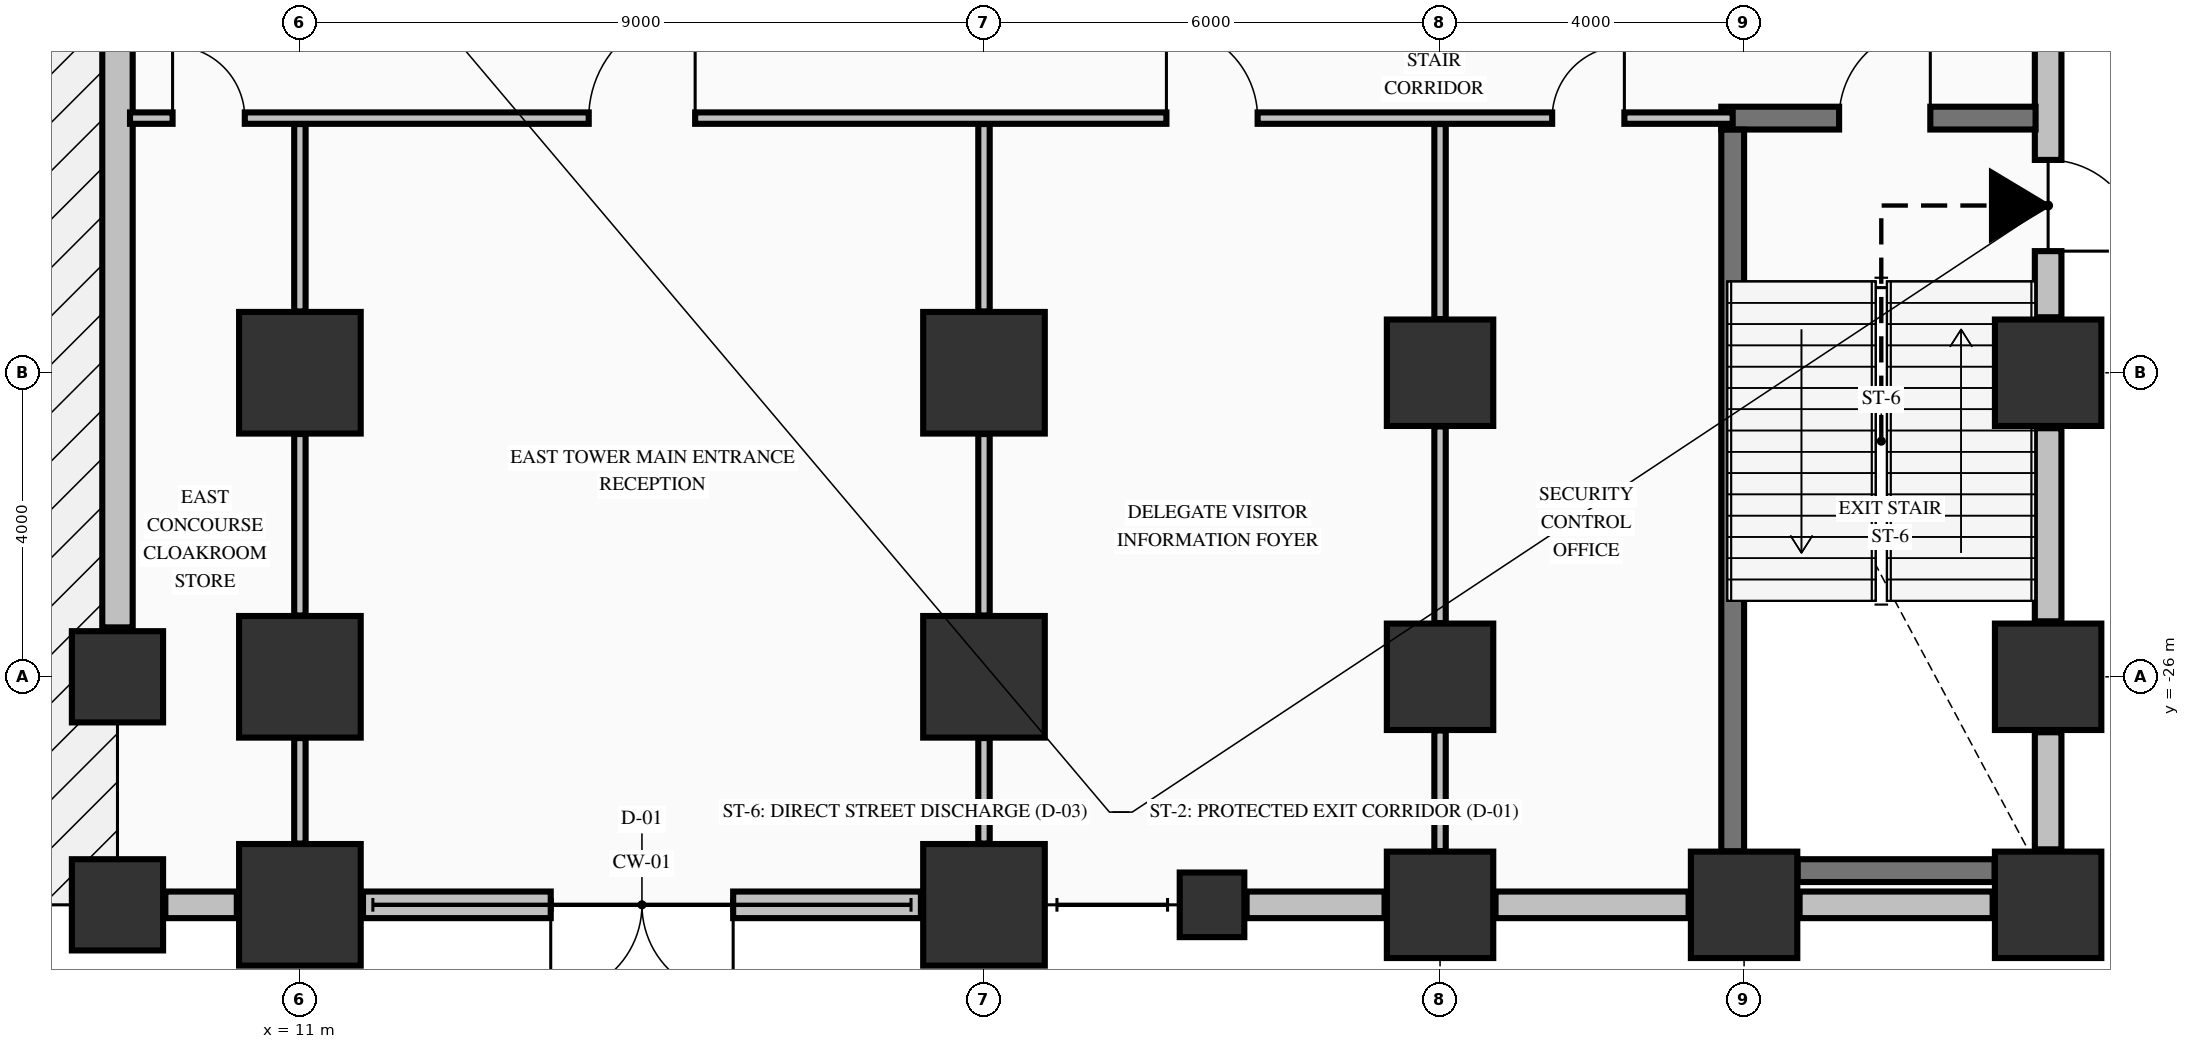
"""IFC4 building model, lengths in metres.
Left out: names, types, materials, properties, quantities, classifications, styles, units other than length and angle.
Written with IfcOpenShell. Run it as: python <this file> out.ifc"""

import sys

from ifc_helpers import new_model, si_unit, direction, frame, frame_2d, origin, origin_2d, place, context, subcontext, project, spatial, rectangle, extrude, element, fill, save


model = new_model("IFC4")
c1 = context("Model", 3, precision=1e-05, world=origin(), true_north=direction((0.0, 1.0)))
c2 = subcontext(c1, "Body", "Model", "MODEL_VIEW")
j1 = project(units=[si_unit("LENGTHUNIT", "METRE"), si_unit("PLANEANGLEUNIT", "RADIAN")], contexts=[c1])
p1 = place(None, origin())
s1 = spatial("IfcSite", under=j1, at=p1, CompositionType="ELEMENT")
p2 = place(p1, origin())
s2 = spatial("IfcBuilding", under=s1, at=p2, CompositionType="ELEMENT")
p3 = place(p2, origin())
s3 = spatial("IfcBuildingStorey", under=s2, at=p3, CompositionType="ELEMENT", Elevation=0.0)
for number, where, z_axis, x_axis in (
    (1, (11.0, -29.0, 0.0), (0.0, 0.0, 1.0), (1.0, 0.0, 0.0)),
    (2, (11.0, -26.0, 0.0), (0.0, 0.0, 1.0), (1.0, 0.0, 0.0)),
    (3, (11.0, -22.0, 0.0), (0.0, 0.0, 1.0), (1.0, 0.0, 0.0)),
    (4, (20.0, -29.0, 0.0), (0.0, 0.0, 1.0), (1.0, 0.0, 0.0)),
    (5, (20.0, -26.0, 0.0), (0.0, 0.0, 1.0), (1.0, 0.0, 0.0)),
    (6, (20.0, -22.0, 0.0), (0.0, 0.0, 1.0), (1.0, 0.0, 0.0)),
):
    element("IfcColumn", number, at=place(p3, frame(where, z_axis=z_axis, x_axis=x_axis)), inside=s3, PredefinedType="COLUMN", context=c2, shape_type="SweptSolid", body=[
        extrude(rectangle(XDim=1.6, YDim=1.6, at=origin_2d()), origin(), (0.0, 0.0, 1.0), 5.09),
    ])
for number, where, z_axis, x_axis in (
    (7, (26.0, -29.0, 0.0), (0.0, 0.0, 1.0), (1.0, 0.0, 0.0)),
    (8, (26.0, -26.0, 0.0), (0.0, 0.0, 1.0), (1.0, 0.0, 0.0)),
    (9, (26.0, -22.0, 0.0), (0.0, 0.0, 1.0), (1.0, 0.0, 0.0)),
    (10, (30.0, -29.0, 0.0), (0.0, 0.0, 1.0), (1.0, 0.0, 0.0)),
    (11, (34.0, -29.0, 0.0), (0.0, 0.0, 1.0), (1.0, 0.0, 0.0)),
    (12, (34.0, -26.0, 0.0), (0.0, 0.0, 1.0), (1.0, 0.0, 0.0)),
    (13, (34.0, -22.0, 0.0), (0.0, 0.0, 1.0), (1.0, 0.0, 0.0)),
):
    element("IfcColumn", number, at=place(p3, frame(where, z_axis=z_axis, x_axis=x_axis)), inside=s3, PredefinedType="COLUMN", context=c2, shape_type="SweptSolid", body=[
        extrude(rectangle(XDim=1.4, YDim=1.4, at=origin_2d()), origin(), (0.0, 0.0, 1.0), 5.09),
    ])
for number, where, z_axis, x_axis in (
    (14, (8.6, -29.0, 0.0), (0.0, 0.0, 1.0), (1.0, 0.0, 0.0)),
    (15, (8.6, -26.0, 0.0), (0.0, 0.0, 1.0), (1.0, 0.0, 0.0)),
):
    element("IfcColumn", number, at=place(p3, frame(where, z_axis=z_axis, x_axis=x_axis)), inside=s3, PredefinedType="COLUMN", context=c2, shape_type="SweptSolid", body=[
        extrude(rectangle(XDim=1.2, YDim=1.2, at=origin_2d()), origin(), (0.0, 0.0, 1.0), 5.09),
    ])
p4 = place(p3, frame((23.0, -29.0, 0.0), z_axis=(0.0, 0.0, 1.0), x_axis=(1.0, 0.0, 0.0)))
e16 = element("IfcColumn", 16, at=p4, inside=s3, PredefinedType="PILASTER", context=c2, shape_type="SweptSolid", body=[
    extrude(rectangle(XDim=0.85, YDim=0.85, at=origin_2d()), origin(), (0.0, 0.0, 1.0), 5.09),
])
p5 = place(p3, frame((9.23, -29.0, 0.0), z_axis=(0.0, 0.0, 1.0), x_axis=(1.0, 0.0, 0.0)))
e17 = element("IfcWall", 17, at=p5, inside=s3, PredefinedType="STANDARD", context=c2, shape_type="SweptSolid", body=[
    extrude(rectangle(XDim=0.94, YDim=0.35, at=frame_2d((0.47, 0.0))), origin(), (0.0, 0.0, 1.0), 4.482),
])
p6 = place(p3, frame((19.17, -29.0, 0.0), z_axis=(0.0, 0.0, 1.0), x_axis=(-1.0, 0.0, 0.0)))
e18 = element("IfcWall", 18, at=p6, inside=s3, PredefinedType="STANDARD", context=c2, shape_type="SweptSolid", body=[
    extrude(rectangle(XDim=7.34, YDim=0.35, at=frame_2d((3.67, 0.0))), origin(), (0.0, 0.0, 1.0), 2.85),
])
p7 = place(p6, frame((2.47, 0.0, 0.0)))
e19 = element("IfcOpeningElement", 19, at=p7, cuts=e18, PredefinedType="OPENING", context=c2, shape_type="SweptSolid", body=[
    extrude(rectangle(XDim=2.4, YDim=2.6, at=frame_2d((1.2, 1.3))), frame((0.0, 0.185, 0.0), z_axis=(0.0, -1.0, 0.0), x_axis=(1.0, 0.0, 0.0)), (0.0, 0.0, 1.0), 0.37),
])
p8 = place(p3, frame((23.455, -29.0, 0.0), z_axis=(0.0, 0.0, 1.0), x_axis=(1.0, 0.0, 0.0)))
e20 = element("IfcWall", 20, at=p8, inside=s3, PredefinedType="STANDARD", context=c2, shape_type="SweptSolid", body=[
    extrude(rectangle(XDim=1.815, YDim=0.35, at=frame_2d((0.907, 0.0))), origin(), (0.0, 0.0, 1.0), 4.482),
])
for number, where, z_axis, x_axis in (
    (21, (26.73, -29.0, 0.0), (0.0, 0.0, 1.0), (1.0, 0.0, 0.0)),
    (22, (30.73, -29.0, 0.0), (0.0, 0.0, 1.0), (1.0, 0.0, 0.0)),
):
    element("IfcWall", number, at=place(p3, frame(where, z_axis=z_axis, x_axis=x_axis)), inside=s3, PredefinedType="STANDARD", context=c2, shape_type="SweptSolid", body=[
        extrude(rectangle(XDim=2.54, YDim=0.35, at=frame_2d((1.27, 0.0))), origin(), (0.0, 0.0, 1.0), 4.482),
    ])
p9 = place(p3, frame((34.0, -26.73, 0.0), z_axis=(0.0, 0.0, 1.0), x_axis=(0.0, -1.0, 0.0)))
e23 = element("IfcWall", 23, at=p9, inside=s3, PredefinedType="STANDARD", context=c2, shape_type="SweptSolid", body=[
    extrude(rectangle(XDim=1.54, YDim=0.35, at=frame_2d((0.77, 0.0))), origin(), (0.0, 0.0, 1.0), 5.09),
])
p10 = place(p3, frame((34.0, -22.73, 0.0), z_axis=(0.0, 0.0, 1.0), x_axis=(0.0, -1.0, 0.0)))
e24 = element("IfcWall", 24, at=p10, inside=s3, PredefinedType="STANDARD", context=c2, shape_type="SweptSolid", body=[
    extrude(rectangle(XDim=2.54, YDim=0.35, at=frame_2d((1.27, 0.0))), origin(), (0.0, 0.0, 1.0), 5.09),
])
p11 = place(p3, frame((34.0, -16.73, 0.0), z_axis=(0.0, 0.0, 1.0), x_axis=(0.0, -1.0, 0.0)))
e25 = element("IfcWall", 25, at=p11, inside=s3, PredefinedType="STANDARD", context=c2, shape_type="SweptSolid", body=[
    extrude(rectangle(XDim=4.54, YDim=0.35, at=frame_2d((2.27, 0.0))), origin(), (0.0, 0.0, 1.0), 5.09),
])
p12 = place(p11, frame((2.47, 0.0, 0.0)))
e26 = element("IfcOpeningElement", 26, at=p12, cuts=e25, PredefinedType="OPENING", context=c2, shape_type="SweptSolid", body=[
    extrude(rectangle(XDim=1.2, YDim=2.2, at=frame_2d((0.6, 1.1))), frame((0.0, 0.185, 0.0), z_axis=(0.0, -1.0, 0.0), x_axis=(1.0, 0.0, 0.0)), (0.0, 0.0, 1.0), 0.37),
])
p13 = place(p3, frame((8.6, -0.65, 0.0), z_axis=(0.0, 0.0, 1.0), x_axis=(0.0, -1.0, 0.0)))
e27 = element("IfcWall", 27, at=p13, inside=s3, PredefinedType="STANDARD", context=c2, shape_type="SweptSolid", body=[
    extrude(rectangle(XDim=24.7, YDim=0.4, at=frame_2d((12.35, 0.0))), origin(), (0.0, 0.0, 1.0), 4.132),
])
p14 = place(p13, frame((10.5, 0.0, 0.0)))
e28 = element("IfcOpeningElement", 28, at=p14, cuts=e27, PredefinedType="OPENING", context=c2, shape_type="SweptSolid", body=[
    extrude(rectangle(XDim=2.4, YDim=2.6, at=frame_2d((1.2, 1.3))), frame((0.0, 0.21, 0.0), z_axis=(0.0, -1.0, 0.0), x_axis=(1.0, 0.0, 0.0)), (0.0, 0.0, 1.0), 0.42),
])
p15 = place(p3, frame((30.704, -28.55, 0.0), z_axis=(0.0, 0.0, 1.0), x_axis=(1.0, 0.0, 0.0)))
e29 = element("IfcWall", 29, at=p15, inside=s3, PredefinedType="SHEAR", context=c2, shape_type="SweptSolid", body=[
    extrude(rectangle(XDim=2.592, YDim=0.3, at=frame_2d((1.296, 0.0))), origin(), (0.0, 0.0, 1.0), 5.09),
])
p16 = place(p3, frame((29.7, -18.65, 0.0), z_axis=(0.0, 0.0, 1.0), x_axis=(1.0, 0.0, 0.0)))
e30 = element("IfcWall", 30, at=p16, inside=s3, PredefinedType="SHEAR", context=c2, shape_type="SweptSolid", body=[
    extrude(rectangle(XDim=4.135, YDim=0.3, at=frame_2d((2.067, 0.0))), origin(), (0.0, 0.0, 1.0), 5.09),
])
p17 = place(p16, frame((1.55, 0.0, 0.0)))
e31 = element("IfcOpeningElement", 31, at=p17, cuts=e30, PredefinedType="OPENING", context=c2, shape_type="SweptSolid", body=[
    extrude(rectangle(XDim=1.2, YDim=2.15, at=frame_2d((0.6, 1.075))), frame((0.0, 0.16, 0.0), z_axis=(0.0, -1.0, 0.0), x_axis=(1.0, 0.0, 0.0)), (0.0, 0.0, 1.0), 0.32),
])
p18 = place(p3, frame((8.765, -18.65, 0.0), z_axis=(0.0, 0.0, 1.0), x_axis=(1.0, 0.0, 0.0)))
e32 = element("IfcWall", 32, at=p18, inside=s3, PredefinedType="PARTITIONING", context=c2, shape_type="SweptSolid", body=[
    extrude(rectangle(XDim=21.085, YDim=0.15, at=frame_2d((10.542, 0.0))), origin(), (0.0, 0.0, 1.0), 5.09),
])
p19 = place(p18, frame((0.56, 0.0, 0.0)))
e33 = element("IfcOpeningElement", 33, at=p19, cuts=e32, PredefinedType="OPENING", context=c2, shape_type="SweptSolid", body=[
    extrude(rectangle(XDim=0.95, YDim=2.15, at=frame_2d((0.475, 1.075))), frame((0.0, 0.085, 0.0), z_axis=(0.0, -1.0, 0.0), x_axis=(1.0, 0.0, 0.0)), (0.0, 0.0, 1.0), 0.17),
])
p20 = place(p18, frame((6.035, 0.0, 0.0)))
e34 = element("IfcOpeningElement", 34, at=p20, cuts=e32, PredefinedType="OPENING", context=c2, shape_type="SweptSolid", body=[
    extrude(rectangle(XDim=1.4, YDim=2.2, at=frame_2d((0.7, 1.1))), frame((0.0, 0.085, 0.0), z_axis=(0.0, -1.0, 0.0), x_axis=(1.0, 0.0, 0.0)), (0.0, 0.0, 1.0), 0.17),
])
p21 = place(p18, frame((13.635, 0.0, 0.0)))
e35 = element("IfcOpeningElement", 35, at=p21, cuts=e32, PredefinedType="OPENING", context=c2, shape_type="SweptSolid", body=[
    extrude(rectangle(XDim=1.2, YDim=2.15, at=frame_2d((0.6, 1.075))), frame((0.0, 0.085, 0.0), z_axis=(0.0, -1.0, 0.0), x_axis=(1.0, 0.0, 0.0)), (0.0, 0.0, 1.0), 0.17),
])
p22 = place(p18, frame((18.71, 0.0, 0.0)))
e36 = element("IfcOpeningElement", 36, at=p22, cuts=e32, PredefinedType="OPENING", context=c2, shape_type="SweptSolid", body=[
    extrude(rectangle(XDim=0.95, YDim=2.15, at=frame_2d((0.475, 1.075))), frame((0.0, 0.085, 0.0), z_axis=(0.0, -1.0, 0.0), x_axis=(1.0, 0.0, 0.0)), (0.0, 0.0, 1.0), 0.17),
])
p23 = place(p3, frame((29.85, -28.296, 0.0), z_axis=(0.0, 0.0, 1.0), x_axis=(0.0, 1.0, 0.0)))
e37 = element("IfcWall", 37, at=p23, inside=s3, PredefinedType="SHEAR", context=c2, shape_type="SweptSolid", body=[
    extrude(rectangle(XDim=9.494, YDim=0.3, at=frame_2d((4.747, 0.0))), origin(), (0.0, 0.0, 1.0), 5.09),
])
p24 = place(p3, frame((11.0, -28.194, 0.0), z_axis=(0.0, 0.0, 1.0), x_axis=(0.0, 1.0, 0.0)))
e38 = element("IfcWall", 38, at=p24, inside=s3, PredefinedType="PARTITIONING", context=c2, shape_type="SweptSolid", body=[
    extrude(rectangle(XDim=1.388, YDim=0.15, at=frame_2d((0.694, 0.0))), origin(), (0.0, 0.0, 1.0), 4.132),
])
p25 = place(p3, frame((11.0, -25.194, 0.0), z_axis=(0.0, 0.0, 1.0), x_axis=(0.0, 1.0, 0.0)))
e39 = element("IfcWall", 39, at=p25, inside=s3, PredefinedType="PARTITIONING", context=c2, shape_type="SweptSolid", body=[
    extrude(rectangle(XDim=2.388, YDim=0.15, at=frame_2d((1.194, 0.0))), origin(), (0.0, 0.0, 1.0), 4.132),
])
p26 = place(p3, frame((11.0, -21.194, 0.0), z_axis=(0.0, 0.0, 1.0), x_axis=(0.0, 1.0, 0.0)))
e40 = element("IfcWall", 40, at=p26, inside=s3, PredefinedType="PARTITIONING", context=c2, shape_type="SweptSolid", body=[
    extrude(rectangle(XDim=2.466, YDim=0.15, at=frame_2d((1.233, 0.0))), origin(), (0.0, 0.0, 1.0), 4.132),
])
p27 = place(p3, frame((20.0, -28.194, 0.0), z_axis=(0.0, 0.0, 1.0), x_axis=(0.0, 1.0, 0.0)))
e41 = element("IfcWall", 41, at=p27, inside=s3, PredefinedType="PARTITIONING", context=c2, shape_type="SweptSolid", body=[
    extrude(rectangle(XDim=1.388, YDim=0.15, at=frame_2d((0.694, 0.0))), origin(), (0.0, 0.0, 1.0), 4.132),
])
p28 = place(p3, frame((20.0, -25.194, 0.0), z_axis=(0.0, 0.0, 1.0), x_axis=(0.0, 1.0, 0.0)))
e42 = element("IfcWall", 42, at=p28, inside=s3, PredefinedType="PARTITIONING", context=c2, shape_type="SweptSolid", body=[
    extrude(rectangle(XDim=2.388, YDim=0.15, at=frame_2d((1.194, 0.0))), origin(), (0.0, 0.0, 1.0), 4.132),
])
p29 = place(p3, frame((20.0, -21.194, 0.0), z_axis=(0.0, 0.0, 1.0), x_axis=(0.0, 1.0, 0.0)))
e43 = element("IfcWall", 43, at=p29, inside=s3, PredefinedType="PARTITIONING", context=c2, shape_type="SweptSolid", body=[
    extrude(rectangle(XDim=2.466, YDim=0.15, at=frame_2d((1.233, 0.0))), origin(), (0.0, 0.0, 1.0), 4.132),
])
p30 = place(p3, frame((26.0, -28.294, 0.0), z_axis=(0.0, 0.0, 1.0), x_axis=(0.0, 1.0, 0.0)))
e44 = element("IfcWall", 44, at=p30, inside=s3, PredefinedType="PARTITIONING", context=c2, shape_type="SweptSolid", body=[
    extrude(rectangle(XDim=1.588, YDim=0.15, at=frame_2d((0.794, 0.0))), origin(), (0.0, 0.0, 1.0), 4.132),
])
p31 = place(p3, frame((26.0, -25.294, 0.0), z_axis=(0.0, 0.0, 1.0), x_axis=(0.0, 1.0, 0.0)))
e45 = element("IfcWall", 45, at=p31, inside=s3, PredefinedType="PARTITIONING", context=c2, shape_type="SweptSolid", body=[
    extrude(rectangle(XDim=2.588, YDim=0.15, at=frame_2d((1.294, 0.0))), origin(), (0.0, 0.0, 1.0), 4.132),
])
p32 = place(p3, frame((26.0, -21.294, 0.0), z_axis=(0.0, 0.0, 1.0), x_axis=(0.0, 1.0, 0.0)))
e46 = element("IfcWall", 46, at=p32, inside=s3, PredefinedType="PARTITIONING", context=c2, shape_type="SweptSolid", body=[
    extrude(rectangle(XDim=2.566, YDim=0.15, at=frame_2d((1.283, 0.0))), origin(), (0.0, 0.0, 1.0), 4.132),
])
p33 = place(p7, origin())
e47 = element("IfcDoor", 47, at=p33, inside=s3, OperationType="DOUBLE_DOOR_DOUBLE_SWING", PredefinedType="DOOR", context=c2, shape_type="SweptSolid", body=[
    extrude(rectangle(XDim=2.4, YDim=2.6, at=frame_2d((1.2, 1.3))), frame((0.0, 0.025, 0.0), z_axis=(0.0, -1.0, 0.0), x_axis=(1.0, 0.0, 0.0)), (0.0, 0.0, 1.0), 0.05),
])
fill(e19, e47)
p34 = place(p12, origin())
e48 = element("IfcDoor", 48, at=p34, inside=s3, OperationType="SINGLE_SWING_RIGHT", PredefinedType="DOOR", context=c2, shape_type="SweptSolid", body=[
    extrude(rectangle(XDim=1.2, YDim=2.2, at=frame_2d((0.6, 1.1))), frame((0.0, 0.025, 0.0), z_axis=(0.0, -1.0, 0.0), x_axis=(1.0, 0.0, 0.0)), (0.0, 0.0, 1.0), 0.05),
])
fill(e26, e48)
p35 = place(p17, origin())
e49 = element("IfcDoor", 49, at=p35, inside=s3, OperationType="SINGLE_SWING_RIGHT", PredefinedType="DOOR", context=c2, shape_type="SweptSolid", body=[
    extrude(rectangle(XDim=1.2, YDim=2.15, at=frame_2d((0.6, 1.075))), frame((0.0, 0.025, 0.0), z_axis=(0.0, -1.0, 0.0), x_axis=(1.0, 0.0, 0.0)), (0.0, 0.0, 1.0), 0.05),
])
fill(e31, e49)
p36 = place(p19, origin())
e50 = element("IfcDoor", 50, at=p36, inside=s3, OperationType="SINGLE_SWING_LEFT", PredefinedType="DOOR", context=c2, shape_type="SweptSolid", body=[
    extrude(rectangle(XDim=0.95, YDim=2.15, at=frame_2d((0.475, 1.075))), frame((0.0, 0.025, 0.0), z_axis=(0.0, -1.0, 0.0), x_axis=(1.0, 0.0, 0.0)), (0.0, 0.0, 1.0), 0.05),
])
fill(e33, e50)
p37 = place(p20, origin())
e51 = element("IfcDoor", 51, at=p37, inside=s3, OperationType="SINGLE_SWING_RIGHT", PredefinedType="DOOR", context=c2, shape_type="SweptSolid", body=[
    extrude(rectangle(XDim=1.4, YDim=2.2, at=frame_2d((0.7, 1.1))), frame((0.0, 0.025, 0.0), z_axis=(0.0, -1.0, 0.0), x_axis=(1.0, 0.0, 0.0)), (0.0, 0.0, 1.0), 0.05),
])
fill(e34, e51)
p38 = place(p21, origin())
e52 = element("IfcDoor", 52, at=p38, inside=s3, OperationType="SINGLE_SWING_LEFT", PredefinedType="DOOR", context=c2, shape_type="SweptSolid", body=[
    extrude(rectangle(XDim=1.2, YDim=2.15, at=frame_2d((0.6, 1.075))), frame((0.0, 0.025, 0.0), z_axis=(0.0, -1.0, 0.0), x_axis=(1.0, 0.0, 0.0)), (0.0, 0.0, 1.0), 0.05),
])
fill(e35, e52)
p39 = place(p22, origin())
e53 = element("IfcDoor", 53, at=p39, inside=s3, OperationType="SINGLE_SWING_RIGHT", PredefinedType="DOOR", context=c2, shape_type="SweptSolid", body=[
    extrude(rectangle(XDim=0.95, YDim=2.15, at=frame_2d((0.475, 1.075))), frame((0.0, 0.025, 0.0), z_axis=(0.0, -1.0, 0.0), x_axis=(1.0, 0.0, 0.0)), (0.0, 0.0, 1.0), 0.05),
])
fill(e36, e53)
save(model, sys.argv[1])
